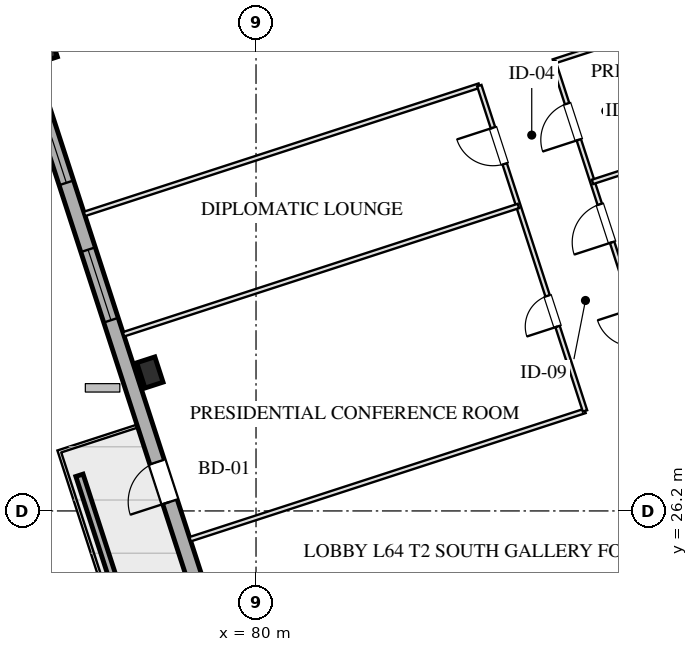
"""IFC4 building model, lengths in metres.
Left out: names, types, materials, properties, quantities, classifications, styles, units other than length and angle.
Written with IfcOpenShell. Run it as: python <this file> out.ifc"""

import sys

from ifc_helpers import new_model, si_unit, direction, frame, frame_2d, origin, origin_2d, place, context, subcontext, project, spatial, rectangle, hollow_rectangle, extrude, element, fill, save


model = new_model("IFC4")
c1 = context("Model", 3, precision=1e-05, world=origin(), true_north=direction((0.0, 1.0)))
c2 = subcontext(c1, "Body", "Model", "MODEL_VIEW")
j1 = project(units=[si_unit("LENGTHUNIT", "METRE"), si_unit("PLANEANGLEUNIT", "RADIAN")], contexts=[c1])
p1 = place(None, origin())
s1 = spatial("IfcSite", under=j1, at=p1, CompositionType="ELEMENT")
p2 = place(p1, origin())
s2 = spatial("IfcBuilding", under=s1, at=p2, CompositionType="ELEMENT")
p3 = place(p2, frame((0.0, 0.0, 237.6)))
s3 = spatial("IfcBuildingStorey", under=s2, at=p3, CompositionType="ELEMENT", Elevation=237.6)
for number, where, z_axis, x_axis in (
    (1, (77.208, 29.844, 0.0), (0.0, 0.0, 1.0), (0.951, 0.309, 0.0)),
    (2, (74.427, 38.403, 0.0), (0.0, 0.0, 1.0), (0.951, 0.309, 0.0)),
):
    element("IfcColumn", number, at=place(p3, frame(where, z_axis=z_axis, x_axis=x_axis)), inside=s3, PredefinedType="COLUMN", context=c2, shape_type="SweptSolid", body=[
        extrude(hollow_rectangle(XDim=0.5, YDim=0.7, WallThickness=0.025, at=origin_2d()), origin(), (0.0, 0.0, 1.0), 3.201),
    ])
p4 = place(p3, frame((82.618, 11.414, 0.0), z_axis=(0.0, 0.0, 1.0), x_axis=(-0.309016491071, 0.951056679828, 0.0)))
e3 = element("IfcWall", 3, at=p4, inside=s3, PredefinedType="SOLIDWALL", context=c2, shape_type="SweptSolid", body=[
    extrude(rectangle(XDim=38.4, YDim=0.4, at=frame_2d((19.2, 0.0))), origin(), (0.0, 0.0, 1.0), 2.36),
])
p5 = place(p4, frame((20.825, 0.0, 0.75)))
e4 = element("IfcOpeningElement", 4, at=p5, cuts=e3, PredefinedType="OPENING", context=c2, shape_type="SweptSolid", body=[
    extrude(rectangle(XDim=1.95, YDim=1.21, at=frame_2d((0.975, 0.605))), frame((0.0, 0.21, 0.0), z_axis=(0.0, -1.0, 0.0), x_axis=(1.0, 0.0, 0.0)), (0.0, 0.0, 1.0), 0.42),
])
p6 = place(p4, frame((24.625, 0.0, 0.75)))
e5 = element("IfcOpeningElement", 5, at=p6, cuts=e3, PredefinedType="OPENING", context=c2, shape_type="SweptSolid", body=[
    extrude(rectangle(XDim=1.95, YDim=1.21, at=frame_2d((0.975, 0.605))), frame((0.0, 0.21, 0.0), z_axis=(0.0, -1.0, 0.0), x_axis=(1.0, 0.0, 0.0)), (0.0, 0.0, 1.0), 0.42),
])
p7 = place(p4, frame((15.8, 0.0, 0.0)))
e6 = element("IfcOpeningElement", 6, at=p7, cuts=e3, PredefinedType="OPENING", context=c2, shape_type="SweptSolid", body=[
    extrude(rectangle(XDim=1.1, YDim=2.15, at=frame_2d((0.55, 1.075))), frame((0.0, 0.21, 0.0), z_axis=(0.0, -1.0, 0.0), x_axis=(1.0, 0.0, 0.0)), (0.0, 0.0, 1.0), 0.42),
])
p8 = place(p3, frame((76.837, 22.573, 0.0), z_axis=(0.0, 0.0, 1.0), x_axis=(-0.309032019345, 0.951051634255, 0.0)))
e7 = element("IfcWall", 7, at=p8, inside=s3, PredefinedType="PARAPET", context=c2, shape_type="SweptSolid", body=[
    extrude(rectangle(XDim=4.8, YDim=0.2, at=frame_2d((2.4, 0.0))), origin(), (0.0, 0.0, 1.0), 0.75),
])
p9 = place(p3, frame((78.266, 25.456, 0.0), z_axis=(0.0, 0.0, 1.0), x_axis=(0.951056072529, 0.309018360142, 0.0)))
e8 = element("IfcWall", 8, at=p9, inside=s3, PredefinedType="PARTITIONING", context=c2, shape_type="SweptSolid", body=[
    extrude(rectangle(XDim=10.925, YDim=0.12, at=frame_2d((5.462, 0.0))), origin(), (0.0, 0.0, 1.0), 2.925),
])
p10 = place(p3, frame((75.485, 34.015, 0.0), z_axis=(0.0, 0.0, 1.0), x_axis=(0.951058206457, 0.309011792544, 0.0)))
e9 = element("IfcWall", 9, at=p10, inside=s3, PredefinedType="PARTITIONING", context=c2, shape_type="SweptSolid", body=[
    extrude(rectangle(XDim=10.925, YDim=0.12, at=frame_2d((5.462, 0.0))), origin(), (0.0, 0.0, 1.0), 2.925),
])
p11 = place(p3, frame((87.825, 38.025, 0.0), z_axis=(0.0, 0.0, 1.0), x_axis=(0.951058110432, 0.309012088082, 0.0)))
e10 = element("IfcWall", 10, at=p11, inside=s3, PredefinedType="PARTITIONING", context=c2, shape_type="SweptSolid", body=[
    extrude(rectangle(XDim=14.625, YDim=0.12, at=frame_2d((7.312, 0.0))), origin(), (0.0, 0.0, 1.0), 2.925),
])
p12 = place(p11, frame((8.845, 0.0, 0.0)))
e11 = element("IfcOpeningElement", 11, at=p12, cuts=e10, PredefinedType="OPENING", context=c2, shape_type="SweptSolid", body=[
    extrude(rectangle(XDim=1.0, YDim=2.05, at=frame_2d((0.5, 1.025))), frame((0.0, 0.07, 0.0), z_axis=(0.0, -1.0, 0.0), x_axis=(1.0, 0.0, 0.0)), (0.0, 0.0, 1.0), 0.14),
])
p13 = place(p3, frame((88.656, 28.832, 0.0), z_axis=(0.0, 0.0, 1.0), x_axis=(-0.309000197986, 0.951061973609, 0.0)))
e12 = element("IfcWall", 12, at=p13, inside=s3, PredefinedType="PARTITIONING", context=c2, shape_type="SweptSolid", body=[
    extrude(rectangle(XDim=9.0, YDim=0.12, at=frame_2d((4.5, 0.0))), origin(), (0.0, 0.0, 1.0), 2.925),
])
p14 = place(p13, frame((2.335, 0.0, 0.0)))
e13 = element("IfcOpeningElement", 13, at=p14, cuts=e12, PredefinedType="OPENING", context=c2, shape_type="SweptSolid", body=[
    extrude(rectangle(XDim=0.85, YDim=2.05, at=frame_2d((0.425, 1.025))), frame((0.0, 0.07, 0.0), z_axis=(0.0, -1.0, 0.0), x_axis=(1.0, 0.0, 0.0)), (0.0, 0.0, 1.0), 0.14),
])
p15 = place(p13, frame((6.835, 0.0, 0.0)))
e14 = element("IfcOpeningElement", 14, at=p15, cuts=e12, PredefinedType="OPENING", context=c2, shape_type="SweptSolid", body=[
    extrude(rectangle(XDim=1.0, YDim=2.05, at=frame_2d((0.5, 1.025))), frame((0.0, 0.07, 0.0), z_axis=(0.0, -1.0, 0.0), x_axis=(1.0, 0.0, 0.0)), (0.0, 0.0, 1.0), 0.14),
])
p16 = place(p3, frame((90.606, 29.465, 0.0), z_axis=(0.0, 0.0, 1.0), x_axis=(-0.309024734286, 0.951054001411, 0.0)))
e15 = element("IfcWall", 15, at=p16, inside=s3, PredefinedType="PARTITIONING", context=c2, shape_type="SweptSolid", body=[
    extrude(rectangle(XDim=9.0, YDim=0.12, at=frame_2d((4.5, 0.0))), origin(), (0.0, 0.0, 1.0), 2.925),
])
p17 = place(p16, frame((1.165, 0.0, 0.0)))
e16 = element("IfcOpeningElement", 16, at=p17, cuts=e15, PredefinedType="OPENING", context=c2, shape_type="SweptSolid", body=[
    extrude(rectangle(XDim=1.0, YDim=2.05, at=frame_2d((0.5, 1.025))), frame((0.0, 0.07, 0.0), z_axis=(0.0, -1.0, 0.0), x_axis=(1.0, 0.0, 0.0)), (0.0, 0.0, 1.0), 0.14),
])
p18 = place(p16, frame((4.0, 0.0, 0.0)))
e17 = element("IfcOpeningElement", 17, at=p18, cuts=e15, PredefinedType="OPENING", context=c2, shape_type="SweptSolid", body=[
    extrude(rectangle(XDim=1.05, YDim=2.05, at=frame_2d((0.525, 1.025))), frame((0.0, 0.07, 0.0), z_axis=(0.0, -1.0, 0.0), x_axis=(1.0, 0.0, 0.0)), (0.0, 0.0, 1.0), 0.14),
])
p19 = place(p16, frame((6.835, 0.0, 0.0)))
e18 = element("IfcOpeningElement", 18, at=p19, cuts=e15, PredefinedType="OPENING", context=c2, shape_type="SweptSolid", body=[
    extrude(rectangle(XDim=1.0, YDim=2.05, at=frame_2d((0.5, 1.025))), frame((0.0, 0.07, 0.0), z_axis=(0.0, -1.0, 0.0), x_axis=(1.0, 0.0, 0.0)), (0.0, 0.0, 1.0), 0.14),
])
p20 = place(p3, frame((76.514, 30.848, 0.0), z_axis=(0.0, 0.0, 1.0), x_axis=(0.951056072529, 0.309018360142, 0.0)))
e19 = element("IfcWall", 19, at=p20, inside=s3, PredefinedType="PARTITIONING", context=c2, shape_type="SweptSolid", body=[
    extrude(rectangle(XDim=10.925, YDim=0.12, at=frame_2d((5.462, 0.0))), origin(), (0.0, 0.0, 1.0), 2.925),
])
p21 = place(p3, frame((88.854, 34.858, 0.0), z_axis=(0.0, 0.0, 1.0), x_axis=(0.951058110432, 0.309012088082, 0.0)))
e20 = element("IfcWall", 20, at=p21, inside=s3, PredefinedType="PARTITIONING", context=c2, shape_type="SweptSolid", body=[
    extrude(rectangle(XDim=14.625, YDim=0.12, at=frame_2d((7.312, 0.0))), origin(), (0.0, 0.0, 1.0), 2.925),
])
p22 = place(p5, origin())
e21 = element("IfcWindow", 21, at=p22, inside=s3, PartitioningType="TRIPLE_PANEL_VERTICAL", PredefinedType="WINDOW", context=c2, shape_type="SweptSolid", body=[
    extrude(rectangle(XDim=1.95, YDim=1.21, at=frame_2d((0.975, 0.605))), frame((0.0, 0.03, 0.0), z_axis=(0.0, -1.0, 0.0), x_axis=(1.0, 0.0, 0.0)), (0.0, 0.0, 1.0), 0.06),
])
fill(e4, e21)
p23 = place(p6, origin())
e22 = element("IfcWindow", 22, at=p23, inside=s3, PartitioningType="TRIPLE_PANEL_VERTICAL", PredefinedType="WINDOW", context=c2, shape_type="SweptSolid", body=[
    extrude(rectangle(XDim=1.95, YDim=1.21, at=frame_2d((0.975, 0.605))), frame((0.0, 0.03, 0.0), z_axis=(0.0, -1.0, 0.0), x_axis=(1.0, 0.0, 0.0)), (0.0, 0.0, 1.0), 0.06),
])
fill(e5, e22)
p24 = place(p7, origin())
e23 = element("IfcDoor", 23, at=p24, inside=s3, OperationType="SINGLE_SWING_LEFT", PredefinedType="DOOR", context=c2, shape_type="SweptSolid", body=[
    extrude(rectangle(XDim=1.1, YDim=2.15, at=frame_2d((0.55, 1.075))), frame((0.0, 0.025, 0.0), z_axis=(0.0, -1.0, 0.0), x_axis=(1.0, 0.0, 0.0)), (0.0, 0.0, 1.0), 0.05),
])
fill(e6, e23)
p25 = place(p14, origin())
e24 = element("IfcDoor", 24, at=p25, inside=s3, OperationType="SINGLE_SWING_LEFT", PredefinedType="DOOR", context=c2, shape_type="SweptSolid", body=[
    extrude(rectangle(XDim=0.85, YDim=2.05, at=frame_2d((0.425, 1.025))), frame((0.0, 0.025, 0.0), z_axis=(0.0, -1.0, 0.0), x_axis=(1.0, 0.0, 0.0)), (0.0, 0.0, 1.0), 0.05),
])
fill(e13, e24)
p26 = place(p15, origin())
e25 = element("IfcDoor", 25, at=p26, inside=s3, OperationType="SINGLE_SWING_RIGHT", PredefinedType="DOOR", context=c2, shape_type="SweptSolid", body=[
    extrude(rectangle(XDim=1.0, YDim=2.05, at=frame_2d((0.5, 1.025))), frame((0.0, 0.025, 0.0), z_axis=(0.0, -1.0, 0.0), x_axis=(1.0, 0.0, 0.0)), (0.0, 0.0, 1.0), 0.05),
])
fill(e14, e25)
p27 = place(p18, origin())
e26 = element("IfcDoor", 26, at=p27, inside=s3, OperationType="SINGLE_SWING_LEFT", PredefinedType="DOOR", context=c2, shape_type="SweptSolid", body=[
    extrude(rectangle(XDim=1.05, YDim=2.05, at=frame_2d((0.525, 1.025))), frame((0.0, 0.025, 0.0), z_axis=(0.0, -1.0, 0.0), x_axis=(1.0, 0.0, 0.0)), (0.0, 0.0, 1.0), 0.05),
])
fill(e17, e26)
p28 = place(p19, origin())
e27 = element("IfcDoor", 27, at=p28, inside=s3, OperationType="SINGLE_SWING_LEFT", PredefinedType="DOOR", context=c2, shape_type="SweptSolid", body=[
    extrude(rectangle(XDim=1.0, YDim=2.05, at=frame_2d((0.5, 1.025))), frame((0.0, 0.025, 0.0), z_axis=(0.0, -1.0, 0.0), x_axis=(1.0, 0.0, 0.0)), (0.0, 0.0, 1.0), 0.05),
])
fill(e18, e27)
save(model, sys.argv[1])
